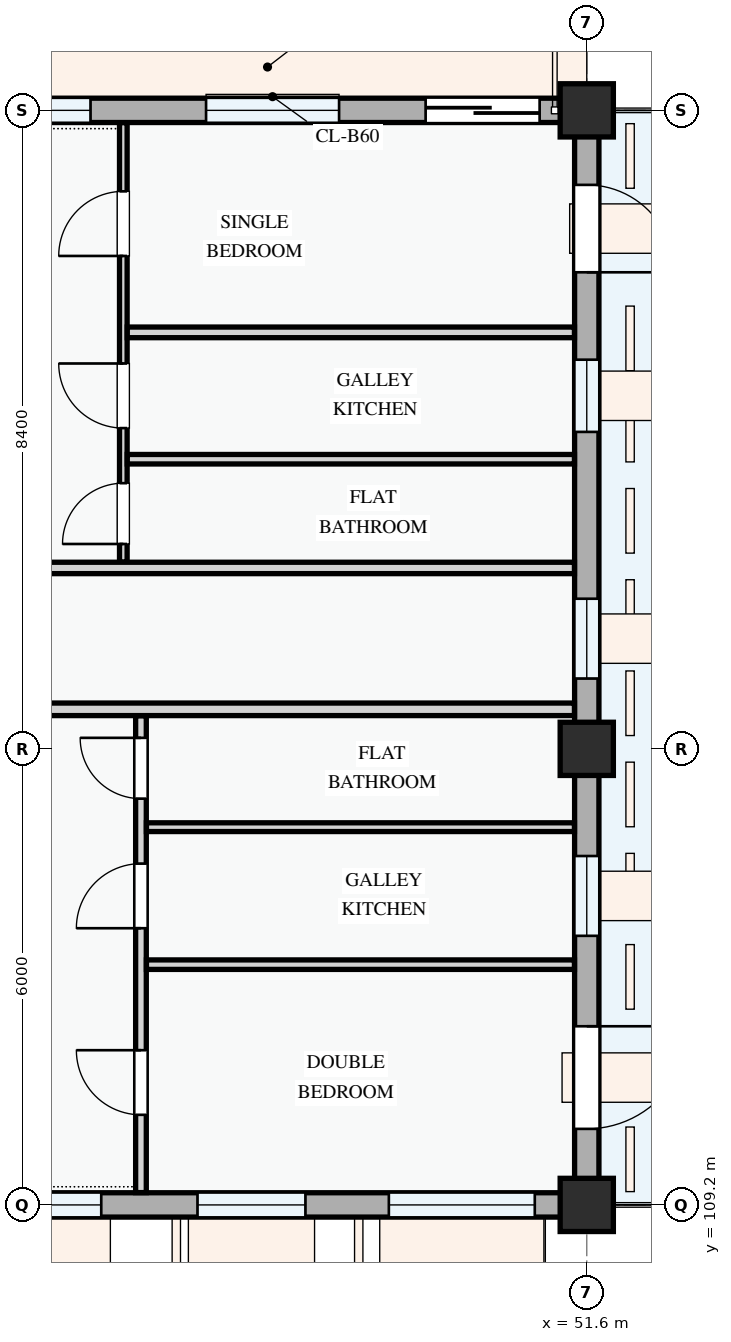
"""IFC4 building model, lengths in metres.
Left out: names, types, materials, properties, quantities, classifications, styles, units other than length and angle.
Written with IfcOpenShell. Run it as: python <this file> out.ifc"""

import sys

from ifc_helpers import new_model, si_unit, direction, frame, frame_2d, origin, origin_2d, place, context, subcontext, project, spatial, rectangle, extrude, element, fill, save


model = new_model("IFC4")
c1 = context("Model", 3, precision=1e-05, world=origin(), true_north=direction((0.0, 1.0)))
c2 = subcontext(c1, "Body", "Model", "MODEL_VIEW")
j1 = project(units=[si_unit("LENGTHUNIT", "METRE"), si_unit("PLANEANGLEUNIT", "RADIAN")], contexts=[c1])
p1 = place(None, origin())
s1 = spatial("IfcSite", under=j1, at=p1, CompositionType="ELEMENT")
p2 = place(p1, origin())
s2 = spatial("IfcBuilding", under=s1, at=p2, CompositionType="ELEMENT")
p3 = place(p2, frame((0.0, 0.0, 21.3)))
s3 = spatial("IfcBuildingStorey", under=s2, at=p3, CompositionType="ELEMENT", Elevation=21.3)
for number, where, z_axis, x_axis in (
    (1, (51.6, 109.2, 0.0), (0.0, 0.0, 1.0), (1.0, 0.0, 0.0)),
    (2, (51.6, 115.2, 0.0), (0.0, 0.0, 1.0), (1.0, 0.0, 0.0)),
    (3, (51.6, 123.6, 0.0), (0.0, 0.0, 1.0), (1.0, 0.0, 0.0)),
):
    element("IfcColumn", number, at=place(p3, frame(where, z_axis=z_axis, x_axis=x_axis)), inside=s3, PredefinedType="COLUMN", context=c2, shape_type="SweptSolid", body=[
        extrude(rectangle(XDim=0.7, YDim=0.7, at=origin_2d()), origin(), (0.0, 0.0, 1.0), 3.3),
    ])
p4 = place(p3, frame((43.2, 109.2, 0.0), z_axis=(0.0, 0.0, 1.0), x_axis=(1.0, 0.0, 0.0)))
e4 = element("IfcWall", 4, at=p4, inside=s3, PredefinedType="STANDARD", context=c2, shape_type="SweptSolid", body=[
    extrude(rectangle(XDim=8.4, YDim=0.32, at=frame_2d((4.2, 0.0))), origin(), (0.0, 0.0, 1.0), 2.375),
])
p5 = place(p4, frame((0.712, 0.0, 0.78)))
e5 = element("IfcOpeningElement", 5, at=p5, cuts=e4, PredefinedType="OPENING", context=c2, shape_type="SweptSolid", body=[
    extrude(rectangle(XDim=1.3, YDim=1.4, at=frame_2d((0.65, 0.7))), frame((0.0, 0.17, 0.0), z_axis=(0.0, -1.0, 0.0), x_axis=(1.0, 0.0, 0.0)), (0.0, 0.0, 1.0), 0.34),
])
p6 = place(p4, frame((3.279, 0.0, 0.78)))
e6 = element("IfcOpeningElement", 6, at=p6, cuts=e4, PredefinedType="OPENING", context=c2, shape_type="SweptSolid", body=[
    extrude(rectangle(XDim=1.42, YDim=1.38, at=frame_2d((0.71, 0.69))), frame((0.0, 0.17, 0.0), z_axis=(0.0, -1.0, 0.0), x_axis=(1.0, 0.0, 0.0)), (0.0, 0.0, 1.0), 0.34),
])
p7 = place(p4, frame((5.796, 0.0, 0.78)))
e7 = element("IfcOpeningElement", 7, at=p7, cuts=e4, PredefinedType="OPENING", context=c2, shape_type="SweptSolid", body=[
    extrude(rectangle(XDim=1.92, YDim=1.44, at=frame_2d((0.96, 0.72))), frame((0.0, 0.17, 0.0), z_axis=(0.0, -1.0, 0.0), x_axis=(1.0, 0.0, 0.0)), (0.0, 0.0, 1.0), 0.34),
])
p8 = place(p3, frame((51.6, 109.2, 0.0), z_axis=(0.0, 0.0, 1.0), x_axis=(0.0, 1.0, 0.0)))
e8 = element("IfcWall", 8, at=p8, inside=s3, PredefinedType="STANDARD", context=c2, shape_type="SweptSolid", body=[
    extrude(rectangle(XDim=6.0, YDim=0.32, at=frame_2d((3.0, 0.0))), origin(), (0.0, 0.0, 1.0), 2.575),
])
p9 = place(p8, frame((1.0, 0.0, 0.0)))
e9 = element("IfcOpeningElement", 9, at=p9, cuts=e8, PredefinedType="OPENING", context=c2, shape_type="SweptSolid", body=[
    extrude(rectangle(XDim=1.35, YDim=2.2, at=frame_2d((0.675, 1.1))), frame((0.0, 0.17, 0.0), z_axis=(0.0, -1.0, 0.0), x_axis=(1.0, 0.0, 0.0)), (0.0, 0.0, 1.0), 0.34),
])
p10 = place(p8, frame((3.54, 0.0, 0.78)))
e10 = element("IfcOpeningElement", 10, at=p10, cuts=e8, PredefinedType="OPENING", context=c2, shape_type="SweptSolid", body=[
    extrude(rectangle(XDim=1.05, YDim=1.2, at=frame_2d((0.525, 0.6))), frame((0.0, 0.17, 0.0), z_axis=(0.0, -1.0, 0.0), x_axis=(1.0, 0.0, 0.0)), (0.0, 0.0, 1.0), 0.34),
])
p11 = place(p3, frame((51.6, 115.2, 0.0), z_axis=(0.0, 0.0, 1.0), x_axis=(0.0, 1.0, 0.0)))
e11 = element("IfcWall", 11, at=p11, inside=s3, PredefinedType="STANDARD", context=c2, shape_type="SweptSolid", body=[
    extrude(rectangle(XDim=8.4, YDim=0.32, at=frame_2d((4.2, 0.0))), origin(), (0.0, 0.0, 1.0), 2.425),
])
p12 = place(p11, frame((6.27, 0.0, 0.0)))
e12 = element("IfcOpeningElement", 12, at=p12, cuts=e11, PredefinedType="OPENING", context=c2, shape_type="SweptSolid", body=[
    extrude(rectangle(XDim=1.15, YDim=2.15, at=frame_2d((0.575, 1.075))), frame((0.0, 0.17, 0.0), z_axis=(0.0, -1.0, 0.0), x_axis=(1.0, 0.0, 0.0)), (0.0, 0.0, 1.0), 0.34),
])
p13 = place(p11, frame((0.925, 0.0, 0.78)))
e13 = element("IfcOpeningElement", 13, at=p13, cuts=e11, PredefinedType="OPENING", context=c2, shape_type="SweptSolid", body=[
    extrude(rectangle(XDim=1.05, YDim=1.2, at=frame_2d((0.525, 0.6))), frame((0.0, 0.17, 0.0), z_axis=(0.0, -1.0, 0.0), x_axis=(1.0, 0.0, 0.0)), (0.0, 0.0, 1.0), 0.34),
])
p14 = place(p11, frame((4.17, 0.0, 0.78)))
e14 = element("IfcOpeningElement", 14, at=p14, cuts=e11, PredefinedType="OPENING", context=c2, shape_type="SweptSolid", body=[
    extrude(rectangle(XDim=0.95, YDim=1.15, at=frame_2d((0.475, 0.575))), frame((0.0, 0.17, 0.0), z_axis=(0.0, -1.0, 0.0), x_axis=(1.0, 0.0, 0.0)), (0.0, 0.0, 1.0), 0.34),
])
p15 = place(p3, frame((51.6, 123.6, 0.0), z_axis=(0.0, 0.0, 1.0), x_axis=(-1.0, 0.0, 0.0)))
e15 = element("IfcWall", 15, at=p15, inside=s3, PredefinedType="STANDARD", context=c2, shape_type="SweptSolid", body=[
    extrude(rectangle(XDim=8.4, YDim=0.32, at=frame_2d((4.2, 0.0))), origin(), (0.0, 0.0, 1.0), 2.345),
])
p16 = place(p15, frame((0.62, 0.0, 0.0)))
e16 = element("IfcOpeningElement", 16, at=p16, cuts=e15, PredefinedType="OPENING", context=c2, shape_type="SweptSolid", body=[
    extrude(rectangle(XDim=1.5, YDim=2.2, at=frame_2d((0.75, 1.1))), frame((0.0, 0.17, 0.0), z_axis=(0.0, -1.0, 0.0), x_axis=(1.0, 0.0, 0.0)), (0.0, 0.0, 1.0), 0.34),
])
p17 = place(p15, frame((3.259, 0.0, 0.78)))
e17 = element("IfcOpeningElement", 17, at=p17, cuts=e15, PredefinedType="OPENING", context=c2, shape_type="SweptSolid", body=[
    extrude(rectangle(XDim=1.75, YDim=1.45, at=frame_2d((0.875, 0.725))), frame((0.0, 0.17, 0.0), z_axis=(0.0, -1.0, 0.0), x_axis=(1.0, 0.0, 0.0)), (0.0, 0.0, 1.0), 0.34),
])
p18 = place(p15, frame((6.529, 0.0, 0.78)))
e18 = element("IfcOpeningElement", 18, at=p18, cuts=e15, PredefinedType="OPENING", context=c2, shape_type="SweptSolid", body=[
    extrude(rectangle(XDim=1.25, YDim=1.45, at=frame_2d((0.625, 0.725))), frame((0.0, 0.17, 0.0), z_axis=(0.0, -1.0, 0.0), x_axis=(1.0, 0.0, 0.0)), (0.0, 0.0, 1.0), 0.34),
])
p19 = place(p3, frame((45.735, 109.362, 0.0), z_axis=(0.0, 0.0, 1.0), x_axis=(0.0, 1.0, 0.0)))
e19 = element("IfcWall", 19, at=p19, inside=s3, PredefinedType="PARTITIONING", context=c2, shape_type="SweptSolid", body=[
    extrude(rectangle(XDim=6.273, YDim=0.14, at=frame_2d((3.137, 0.0))), origin(), (0.0, 0.0, 1.0), 3.0),
])
p20 = place(p19, frame((1.023, 0.0, 0.0)))
e20 = element("IfcOpeningElement", 20, at=p20, cuts=e19, PredefinedType="OPENING", context=c2, shape_type="SweptSolid", body=[
    extrude(rectangle(XDim=0.85, YDim=2.1, at=frame_2d((0.425, 1.05))), frame((0.0, 0.08, 0.0), z_axis=(0.0, -1.0, 0.0), x_axis=(1.0, 0.0, 0.0)), (0.0, 0.0, 1.0), 0.16),
])
p21 = place(p19, frame((3.478, 0.0, 0.0)))
e21 = element("IfcOpeningElement", 21, at=p21, cuts=e19, PredefinedType="OPENING", context=c2, shape_type="SweptSolid", body=[
    extrude(rectangle(XDim=0.85, YDim=2.1, at=frame_2d((0.425, 1.05))), frame((0.0, 0.08, 0.0), z_axis=(0.0, -1.0, 0.0), x_axis=(1.0, 0.0, 0.0)), (0.0, 0.0, 1.0), 0.16),
])
p22 = place(p19, frame((5.183, 0.0, 0.0)))
e22 = element("IfcOpeningElement", 22, at=p22, cuts=e19, PredefinedType="OPENING", context=c2, shape_type="SweptSolid", body=[
    extrude(rectangle(XDim=0.8, YDim=2.1, at=frame_2d((0.4, 1.05))), frame((0.0, 0.08, 0.0), z_axis=(0.0, -1.0, 0.0), x_axis=(1.0, 0.0, 0.0)), (0.0, 0.0, 1.0), 0.16),
])
p23 = place(p3, frame((45.807, 112.361, 0.0), z_axis=(0.0, 0.0, 1.0), x_axis=(1.0, 0.0, 0.0)))
e23 = element("IfcWall", 23, at=p23, inside=s3, PredefinedType="PARTITIONING", context=c2, shape_type="SweptSolid", body=[
    extrude(rectangle(XDim=5.631, YDim=0.125, at=frame_2d((2.815, 0.0))), origin(), (0.0, 0.0, 1.0), 3.0),
])
p24 = place(p3, frame((45.807, 114.17, 0.0), z_axis=(0.0, 0.0, 1.0), x_axis=(1.0, 0.0, 0.0)))
e24 = element("IfcWall", 24, at=p24, inside=s3, PredefinedType="PARTITIONING", context=c2, shape_type="SweptSolid", body=[
    extrude(rectangle(XDim=5.631, YDim=0.115, at=frame_2d((2.815, 0.0))), origin(), (0.0, 0.0, 1.0), 3.0),
])
p25 = place(p3, frame((45.503, 117.657, 0.0), z_axis=(0.0, 0.0, 1.0), x_axis=(0.0, 1.0, 0.0)))
e25 = element("IfcWall", 25, at=p25, inside=s3, PredefinedType="PARTITIONING", context=c2, shape_type="SweptSolid", body=[
    extrude(rectangle(XDim=5.781, YDim=0.1, at=frame_2d((2.891, 0.0))), origin(), (0.0, 0.0, 1.0), 3.0),
])
p26 = place(p25, frame((0.238, 0.0, 0.0)))
e26 = element("IfcOpeningElement", 26, at=p26, cuts=e25, PredefinedType="OPENING", context=c2, shape_type="SweptSolid", body=[
    extrude(rectangle(XDim=0.8, YDim=2.1, at=frame_2d((0.4, 1.05))), frame((0.0, 0.06, 0.0), z_axis=(0.0, -1.0, 0.0), x_axis=(1.0, 0.0, 0.0)), (0.0, 0.0, 1.0), 0.12),
])
p27 = place(p25, frame((1.763, 0.0, 0.0)))
e27 = element("IfcOpeningElement", 27, at=p27, cuts=e25, PredefinedType="OPENING", context=c2, shape_type="SweptSolid", body=[
    extrude(rectangle(XDim=0.85, YDim=2.1, at=frame_2d((0.425, 1.05))), frame((0.0, 0.06, 0.0), z_axis=(0.0, -1.0, 0.0), x_axis=(1.0, 0.0, 0.0)), (0.0, 0.0, 1.0), 0.12),
])
p28 = place(p25, frame((4.028, 0.0, 0.0)))
e28 = element("IfcOpeningElement", 28, at=p28, cuts=e25, PredefinedType="OPENING", context=c2, shape_type="SweptSolid", body=[
    extrude(rectangle(XDim=0.85, YDim=2.1, at=frame_2d((0.425, 1.05))), frame((0.0, 0.06, 0.0), z_axis=(0.0, -1.0, 0.0), x_axis=(1.0, 0.0, 0.0)), (0.0, 0.0, 1.0), 0.12),
])
p29 = place(p3, frame((45.555, 120.679, 0.0), z_axis=(0.0, 0.0, 1.0), x_axis=(1.0, 0.0, 0.0)))
e29 = element("IfcWall", 29, at=p29, inside=s3, PredefinedType="PARTITIONING", context=c2, shape_type="SweptSolid", body=[
    extrude(rectangle(XDim=5.883, YDim=0.14, at=frame_2d((2.942, 0.0))), origin(), (0.0, 0.0, 1.0), 3.0),
])
p30 = place(p3, frame((45.555, 119.01, 0.0), z_axis=(0.0, 0.0, 1.0), x_axis=(1.0, 0.0, 0.0)))
e30 = element("IfcWall", 30, at=p30, inside=s3, PredefinedType="PARTITIONING", context=c2, shape_type="SweptSolid", body=[
    extrude(rectangle(XDim=5.883, YDim=0.125, at=frame_2d((2.942, 0.0))), origin(), (0.0, 0.0, 1.0), 3.0),
])
p31 = place(p3, frame((25.15, 115.72, 0.0), z_axis=(0.0, 0.0, 1.0), x_axis=(1.0, 0.0, 0.0)))
e31 = element("IfcWall", 31, at=p31, inside=s3, PredefinedType="PARTITIONING", context=c2, shape_type="SweptSolid", body=[
    extrude(rectangle(XDim=26.288, YDim=0.165, at=frame_2d((13.144, 0.0))), origin(), (0.0, 0.0, 1.0), 3.0),
])
p32 = place(p31, frame((0.25, 0.0, 0.0)))
e32 = element("IfcOpeningElement", 32, at=p32, cuts=e31, PredefinedType="OPENING", context=c2, shape_type="SweptSolid", body=[
    extrude(rectangle(XDim=0.92, YDim=2.1, at=frame_2d((0.46, 1.05))), frame((0.0, 0.093, 0.0), z_axis=(0.0, -1.0, 0.0), x_axis=(1.0, 0.0, 0.0)), (0.0, 0.0, 1.0), 0.185),
])
p33 = place(p31, frame((7.64, 0.0, 0.0)))
e33 = element("IfcOpeningElement", 33, at=p33, cuts=e31, PredefinedType="OPENING", context=c2, shape_type="SweptSolid", body=[
    extrude(rectangle(XDim=0.92, YDim=2.1, at=frame_2d((0.46, 1.05))), frame((0.0, 0.093, 0.0), z_axis=(0.0, -1.0, 0.0), x_axis=(1.0, 0.0, 0.0)), (0.0, 0.0, 1.0), 0.185),
])
p34 = place(p31, frame((15.03, 0.0, 0.0)))
e34 = element("IfcOpeningElement", 34, at=p34, cuts=e31, PredefinedType="OPENING", context=c2, shape_type="SweptSolid", body=[
    extrude(rectangle(XDim=0.96, YDim=2.12, at=frame_2d((0.48, 1.06))), frame((0.0, 0.093, 0.0), z_axis=(0.0, -1.0, 0.0), x_axis=(1.0, 0.0, 0.0)), (0.0, 0.0, 1.0), 0.185),
])
p35 = place(p3, frame((22.66, 117.58, 0.0), z_axis=(0.0, 0.0, 1.0), x_axis=(1.0, 0.0, 0.0)))
e35 = element("IfcWall", 35, at=p35, inside=s3, PredefinedType="PARTITIONING", context=c2, shape_type="SweptSolid", body=[
    extrude(rectangle(XDim=28.778, YDim=0.15, at=frame_2d((14.389, 0.0))), origin(), (0.0, 0.0, 1.0), 3.0),
])
p36 = place(p35, frame((2.74, 0.0, 0.0)))
e36 = element("IfcOpeningElement", 36, at=p36, cuts=e35, PredefinedType="OPENING", context=c2, shape_type="SweptSolid", body=[
    extrude(rectangle(XDim=0.92, YDim=2.1, at=frame_2d((0.46, 1.05))), frame((0.0, 0.085, 0.0), z_axis=(0.0, -1.0, 0.0), x_axis=(1.0, 0.0, 0.0)), (0.0, 0.0, 1.0), 0.17),
])
p37 = place(p35, frame((10.13, 0.0, 0.0)))
e37 = element("IfcOpeningElement", 37, at=p37, cuts=e35, PredefinedType="OPENING", context=c2, shape_type="SweptSolid", body=[
    extrude(rectangle(XDim=0.92, YDim=2.1, at=frame_2d((0.46, 1.05))), frame((0.0, 0.085, 0.0), z_axis=(0.0, -1.0, 0.0), x_axis=(1.0, 0.0, 0.0)), (0.0, 0.0, 1.0), 0.17),
])
p38 = place(p35, frame((17.52, 0.0, 0.0)))
e38 = element("IfcOpeningElement", 38, at=p38, cuts=e35, PredefinedType="OPENING", context=c2, shape_type="SweptSolid", body=[
    extrude(rectangle(XDim=0.92, YDim=2.1, at=frame_2d((0.46, 1.05))), frame((0.0, 0.085, 0.0), z_axis=(0.0, -1.0, 0.0), x_axis=(1.0, 0.0, 0.0)), (0.0, 0.0, 1.0), 0.17),
])
p39 = place(p5, origin())
e39 = element("IfcWindow", 39, at=p39, inside=s3, PartitioningType="SINGLE_PANEL", PredefinedType="WINDOW", context=c2, shape_type="SweptSolid", body=[
    extrude(rectangle(XDim=1.3, YDim=1.4, at=frame_2d((0.65, 0.7))), frame((0.0, 0.03, 0.0), z_axis=(0.0, -1.0, 0.0), x_axis=(1.0, 0.0, 0.0)), (0.0, 0.0, 1.0), 0.06),
])
fill(e5, e39)
p40 = place(p6, origin())
e40 = element("IfcWindow", 40, at=p40, inside=s3, PartitioningType="SINGLE_PANEL", PredefinedType="WINDOW", context=c2, shape_type="SweptSolid", body=[
    extrude(rectangle(XDim=1.42, YDim=1.38, at=frame_2d((0.71, 0.69))), frame((0.0, 0.03, 0.0), z_axis=(0.0, -1.0, 0.0), x_axis=(1.0, 0.0, 0.0)), (0.0, 0.0, 1.0), 0.06),
])
fill(e6, e40)
p41 = place(p7, origin())
e41 = element("IfcWindow", 41, at=p41, inside=s3, PartitioningType="DOUBLE_PANEL_VERTICAL", PredefinedType="WINDOW", context=c2, shape_type="SweptSolid", body=[
    extrude(rectangle(XDim=1.92, YDim=1.44, at=frame_2d((0.96, 0.72))), frame((0.0, 0.03, 0.0), z_axis=(0.0, -1.0, 0.0), x_axis=(1.0, 0.0, 0.0)), (0.0, 0.0, 1.0), 0.06),
])
fill(e7, e41)
p42 = place(p9, frame((1.35, 0.0, 0.0), z_axis=(0.0, 0.0, 1.0), x_axis=(-1.0, 0.0, 0.0)))
e42 = element("IfcDoor", 42, at=p42, inside=s3, OperationType="SINGLE_SWING_LEFT", PredefinedType="DOOR", context=c2, shape_type="SweptSolid", body=[
    extrude(rectangle(XDim=1.35, YDim=2.2, at=frame_2d((0.675, 1.1))), frame((0.0, 0.025, 0.0), z_axis=(0.0, -1.0, 0.0), x_axis=(1.0, 0.0, 0.0)), (0.0, 0.0, 1.0), 0.05),
])
fill(e9, e42)
p43 = place(p10, origin())
e43 = element("IfcWindow", 43, at=p43, inside=s3, PartitioningType="SINGLE_PANEL", PredefinedType="WINDOW", context=c2, shape_type="SweptSolid", body=[
    extrude(rectangle(XDim=1.05, YDim=1.2, at=frame_2d((0.525, 0.6))), frame((0.0, 0.03, 0.0), z_axis=(0.0, -1.0, 0.0), x_axis=(1.0, 0.0, 0.0)), (0.0, 0.0, 1.0), 0.06),
])
fill(e10, e43)
p44 = place(p12, frame((1.15, 0.0, 0.0), z_axis=(0.0, 0.0, 1.0), x_axis=(-1.0, 0.0, 0.0)))
e44 = element("IfcDoor", 44, at=p44, inside=s3, OperationType="SINGLE_SWING_RIGHT", PredefinedType="DOOR", context=c2, shape_type="SweptSolid", body=[
    extrude(rectangle(XDim=1.15, YDim=2.15, at=frame_2d((0.575, 1.075))), frame((0.0, 0.025, 0.0), z_axis=(0.0, -1.0, 0.0), x_axis=(1.0, 0.0, 0.0)), (0.0, 0.0, 1.0), 0.05),
])
fill(e12, e44)
p45 = place(p13, origin())
e45 = element("IfcWindow", 45, at=p45, inside=s3, PartitioningType="SINGLE_PANEL", PredefinedType="WINDOW", context=c2, shape_type="SweptSolid", body=[
    extrude(rectangle(XDim=1.05, YDim=1.2, at=frame_2d((0.525, 0.6))), frame((0.0, 0.03, 0.0), z_axis=(0.0, -1.0, 0.0), x_axis=(1.0, 0.0, 0.0)), (0.0, 0.0, 1.0), 0.06),
])
fill(e13, e45)
p46 = place(p14, origin())
e46 = element("IfcWindow", 46, at=p46, inside=s3, PartitioningType="SINGLE_PANEL", PredefinedType="WINDOW", context=c2, shape_type="SweptSolid", body=[
    extrude(rectangle(XDim=0.95, YDim=1.15, at=frame_2d((0.475, 0.575))), frame((0.0, 0.03, 0.0), z_axis=(0.0, -1.0, 0.0), x_axis=(1.0, 0.0, 0.0)), (0.0, 0.0, 1.0), 0.06),
])
fill(e14, e46)
p47 = place(p16, frame((1.5, 0.0, 0.0), z_axis=(0.0, 0.0, 1.0), x_axis=(-1.0, 0.0, 0.0)))
e47 = element("IfcDoor", 47, at=p47, inside=s3, OperationType="SLIDING_TO_RIGHT", PredefinedType="DOOR", context=c2, shape_type="SweptSolid", body=[
    extrude(rectangle(XDim=1.5, YDim=2.2, at=frame_2d((0.75, 1.1))), frame((0.0, 0.025, 0.0), z_axis=(0.0, -1.0, 0.0), x_axis=(1.0, 0.0, 0.0)), (0.0, 0.0, 1.0), 0.05),
])
fill(e16, e47)
p48 = place(p17, origin())
e48 = element("IfcWindow", 48, at=p48, inside=s3, PartitioningType="DOUBLE_PANEL_VERTICAL", PredefinedType="WINDOW", context=c2, shape_type="SweptSolid", body=[
    extrude(rectangle(XDim=1.75, YDim=1.45, at=frame_2d((0.875, 0.725))), frame((0.0, 0.03, 0.0), z_axis=(0.0, -1.0, 0.0), x_axis=(1.0, 0.0, 0.0)), (0.0, 0.0, 1.0), 0.06),
])
fill(e17, e48)
p49 = place(p18, origin())
e49 = element("IfcWindow", 49, at=p49, inside=s3, PartitioningType="SINGLE_PANEL", PredefinedType="WINDOW", context=c2, shape_type="SweptSolid", body=[
    extrude(rectangle(XDim=1.25, YDim=1.45, at=frame_2d((0.625, 0.725))), frame((0.0, 0.03, 0.0), z_axis=(0.0, -1.0, 0.0), x_axis=(1.0, 0.0, 0.0)), (0.0, 0.0, 1.0), 0.06),
])
fill(e18, e49)
p50 = place(p20, origin())
e50 = element("IfcDoor", 50, at=p50, inside=s3, OperationType="SINGLE_SWING_RIGHT", PredefinedType="DOOR", context=c2, shape_type="SweptSolid", body=[
    extrude(rectangle(XDim=0.85, YDim=2.1, at=frame_2d((0.425, 1.05))), frame((0.0, 0.025, 0.0), z_axis=(0.0, -1.0, 0.0), x_axis=(1.0, 0.0, 0.0)), (0.0, 0.0, 1.0), 0.05),
])
fill(e20, e50)
p51 = place(p21, origin())
e51 = element("IfcDoor", 51, at=p51, inside=s3, OperationType="SINGLE_SWING_LEFT", PredefinedType="DOOR", context=c2, shape_type="SweptSolid", body=[
    extrude(rectangle(XDim=0.85, YDim=2.1, at=frame_2d((0.425, 1.05))), frame((0.0, 0.025, 0.0), z_axis=(0.0, -1.0, 0.0), x_axis=(1.0, 0.0, 0.0)), (0.0, 0.0, 1.0), 0.05),
])
fill(e21, e51)
p52 = place(p22, origin())
e52 = element("IfcDoor", 52, at=p52, inside=s3, OperationType="SINGLE_SWING_RIGHT", PredefinedType="DOOR", context=c2, shape_type="SweptSolid", body=[
    extrude(rectangle(XDim=0.8, YDim=2.1, at=frame_2d((0.4, 1.05))), frame((0.0, 0.025, 0.0), z_axis=(0.0, -1.0, 0.0), x_axis=(1.0, 0.0, 0.0)), (0.0, 0.0, 1.0), 0.05),
])
fill(e22, e52)
p53 = place(p26, origin())
e53 = element("IfcDoor", 53, at=p53, inside=s3, OperationType="SINGLE_SWING_LEFT", PredefinedType="DOOR", context=c2, shape_type="SweptSolid", body=[
    extrude(rectangle(XDim=0.8, YDim=2.1, at=frame_2d((0.4, 1.05))), frame((0.0, 0.025, 0.0), z_axis=(0.0, -1.0, 0.0), x_axis=(1.0, 0.0, 0.0)), (0.0, 0.0, 1.0), 0.05),
])
fill(e26, e53)
p54 = place(p27, origin())
e54 = element("IfcDoor", 54, at=p54, inside=s3, OperationType="SINGLE_SWING_RIGHT", PredefinedType="DOOR", context=c2, shape_type="SweptSolid", body=[
    extrude(rectangle(XDim=0.85, YDim=2.1, at=frame_2d((0.425, 1.05))), frame((0.0, 0.025, 0.0), z_axis=(0.0, -1.0, 0.0), x_axis=(1.0, 0.0, 0.0)), (0.0, 0.0, 1.0), 0.05),
])
fill(e27, e54)
p55 = place(p28, origin())
e55 = element("IfcDoor", 55, at=p55, inside=s3, OperationType="SINGLE_SWING_LEFT", PredefinedType="DOOR", context=c2, shape_type="SweptSolid", body=[
    extrude(rectangle(XDim=0.85, YDim=2.1, at=frame_2d((0.425, 1.05))), frame((0.0, 0.025, 0.0), z_axis=(0.0, -1.0, 0.0), x_axis=(1.0, 0.0, 0.0)), (0.0, 0.0, 1.0), 0.05),
])
fill(e28, e55)
save(model, sys.argv[1])
